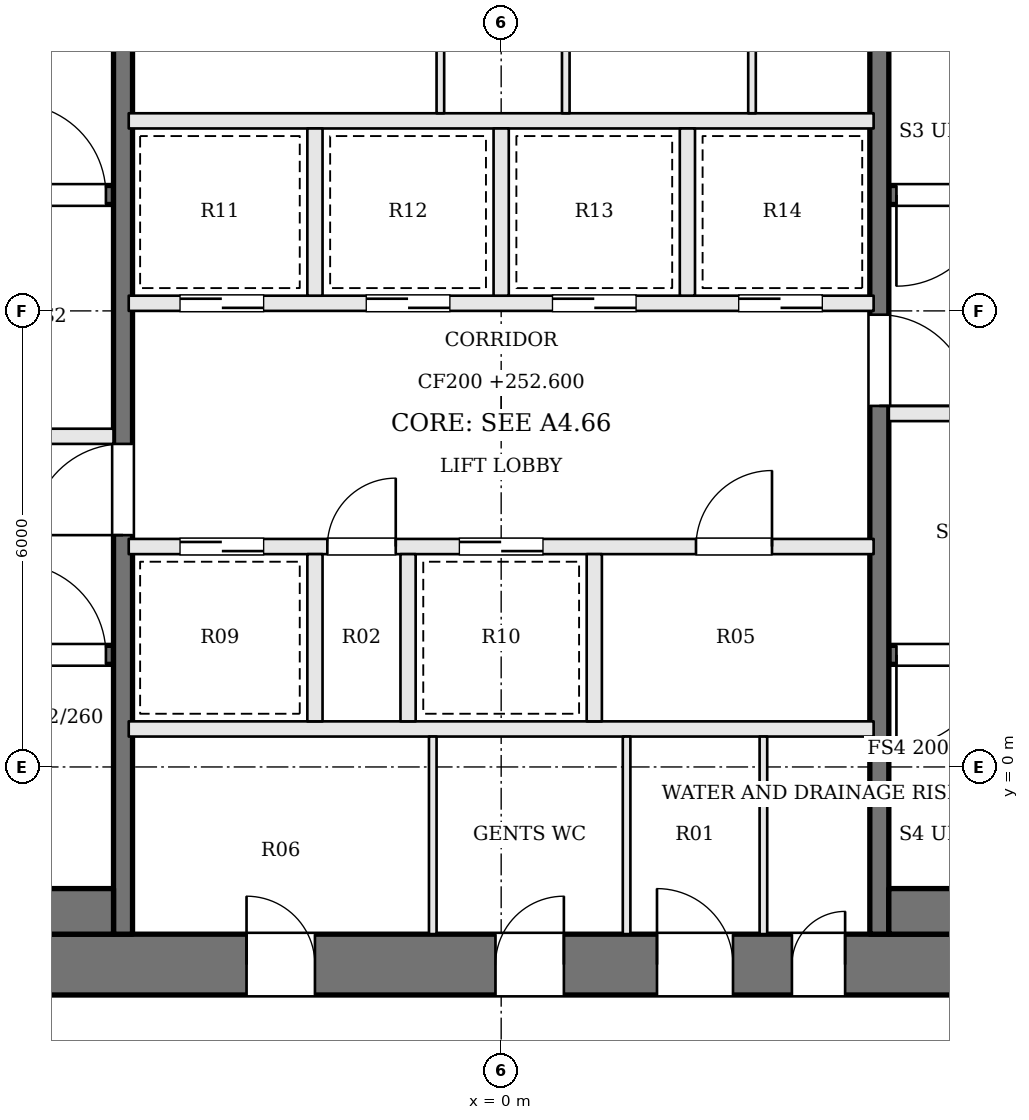
"""IFC4 building model, lengths in metres.
Left out: names, types, materials, properties, quantities, classifications, styles, units other than length and angle.
Written with IfcOpenShell. Run it as: python <this file> out.ifc"""

import sys

from ifc_helpers import new_model, si_unit, direction, frame, frame_2d, origin, place, context, subcontext, project, spatial, rectangle, extrude, element, fill, save


model = new_model("IFC4")
c1 = context("Model", 3, precision=1e-05, world=origin(), true_north=direction((0.0, 1.0)))
c2 = subcontext(c1, "Body", "Model", "MODEL_VIEW")
j1 = project(units=[si_unit("LENGTHUNIT", "METRE"), si_unit("PLANEANGLEUNIT", "RADIAN")], contexts=[c1])
p1 = place(None, origin())
s1 = spatial("IfcSite", under=j1, at=p1, CompositionType="ELEMENT")
p2 = place(p1, origin())
s2 = spatial("IfcBuilding", under=s1, at=p2, CompositionType="ELEMENT")
p3 = place(p2, frame((0.0, 0.0, 252.6)))
s3 = spatial("IfcBuildingStorey", under=s2, at=p3, CompositionType="ELEMENT", Elevation=252.6)
p4 = place(p3, frame((-13.0, -2.6, 0.0), z_axis=(0.0, 0.0, 1.0), x_axis=(1.0, 0.0, 0.0)))
e1 = element("IfcWall", 1, at=p4, inside=s3, PredefinedType="SHEAR", context=c2, shape_type="SweptSolid", body=[
    extrude(rectangle(XDim=26.0, YDim=0.8, at=frame_2d((13.0, 0.0))), origin(), (0.0, 0.0, 1.0), 3.9),
])
p5 = place(p4, frame((9.65, 0.0, 0.0)))
e2 = element("IfcOpeningElement", 2, at=p5, cuts=e1, PredefinedType="OPENING", context=c2, shape_type="SweptSolid", body=[
    extrude(rectangle(XDim=0.9, YDim=2.1, at=frame_2d((0.45, 1.05))), frame((0.0, 0.41, 0.0), z_axis=(0.0, -1.0, 0.0), x_axis=(1.0, 0.0, 0.0)), (0.0, 0.0, 1.0), 0.82),
])
p6 = place(p4, frame((12.925, 0.0, 0.0)))
e3 = element("IfcOpeningElement", 3, at=p6, cuts=e1, PredefinedType="OPENING", context=c2, shape_type="SweptSolid", body=[
    extrude(rectangle(XDim=0.9, YDim=2.1, at=frame_2d((0.45, 1.05))), frame((0.0, 0.41, 0.0), z_axis=(0.0, -1.0, 0.0), x_axis=(1.0, 0.0, 0.0)), (0.0, 0.0, 1.0), 0.82),
])
p7 = place(p4, frame((15.05, 0.0, 0.0)))
e4 = element("IfcOpeningElement", 4, at=p7, cuts=e1, PredefinedType="OPENING", context=c2, shape_type="SweptSolid", body=[
    extrude(rectangle(XDim=1.0, YDim=2.1, at=frame_2d((0.5, 1.05))), frame((0.0, 0.41, 0.0), z_axis=(0.0, -1.0, 0.0), x_axis=(1.0, 0.0, 0.0)), (0.0, 0.0, 1.0), 0.82),
])
p8 = place(p4, frame((16.825, 0.0, 0.0)))
e5 = element("IfcOpeningElement", 5, at=p8, cuts=e1, PredefinedType="OPENING", context=c2, shape_type="SweptSolid", body=[
    extrude(rectangle(XDim=0.7, YDim=2.1, at=frame_2d((0.35, 1.05))), frame((0.0, 0.41, 0.0), z_axis=(0.0, -1.0, 0.0), x_axis=(1.0, 0.0, 0.0)), (0.0, 0.0, 1.0), 0.82),
])
p9 = place(p3, frame((-12.2, 1.475, 0.0), z_axis=(0.0, 0.0, 1.0), x_axis=(1.0, 0.0, 0.0)))
e6 = element("IfcWall", 6, at=p9, inside=s3, PredefinedType="SOLIDWALL", context=c2, shape_type="SweptSolid", body=[
    extrude(rectangle(XDim=7.1, YDim=0.25, at=frame_2d((3.55, 0.0))), origin(), (0.0, 0.0, 1.0), 3.7),
])
p10 = place(p9, frame((5.8, 0.0, 0.0)))
e7 = element("IfcOpeningElement", 7, at=p10, cuts=e6, PredefinedType="OPENING", context=c2, shape_type="SweptSolid", body=[
    extrude(rectangle(XDim=1.2, YDim=2.1, at=frame_2d((0.6, 1.05))), frame((0.0, 0.135, 0.0), z_axis=(0.0, -1.0, 0.0), x_axis=(1.0, 0.0, 0.0)), (0.0, 0.0, 1.0), 0.27),
])
p11 = place(p3, frame((12.2, 7.525, 0.0), z_axis=(0.0, 0.0, 1.0), x_axis=(-1.0, 0.0, 0.0)))
e8 = element("IfcWall", 8, at=p11, inside=s3, PredefinedType="SOLIDWALL", context=c2, shape_type="SweptSolid", body=[
    extrude(rectangle(XDim=7.1, YDim=0.25, at=frame_2d((3.55, 0.0))), origin(), (0.0, 0.0, 1.0), 3.7),
])
p12 = place(p11, frame((5.8, 0.0, 0.0)))
e9 = element("IfcOpeningElement", 9, at=p12, cuts=e8, PredefinedType="OPENING", context=c2, shape_type="SweptSolid", body=[
    extrude(rectangle(XDim=1.2, YDim=2.1, at=frame_2d((0.6, 1.05))), frame((0.0, 0.135, 0.0), z_axis=(0.0, -1.0, 0.0), x_axis=(1.0, 0.0, 0.0)), (0.0, 0.0, 1.0), 0.27),
])
p13 = place(p3, frame((-12.2, 4.35, 0.0), z_axis=(0.0, 0.0, 1.0), x_axis=(1.0, 0.0, 0.0)))
e10 = element("IfcWall", 10, at=p13, inside=s3, PredefinedType="SOLIDWALL", context=c2, shape_type="SweptSolid", body=[
    extrude(rectangle(XDim=7.1, YDim=0.2, at=frame_2d((3.55, 0.0))), origin(), (0.0, 0.0, 1.0), 3.7),
])
p14 = place(p13, frame((4.4, 0.0, 0.0)))
e11 = element("IfcOpeningElement", 11, at=p14, cuts=e10, PredefinedType="OPENING", context=c2, shape_type="SweptSolid", body=[
    extrude(rectangle(XDim=1.2, YDim=2.1, at=frame_2d((0.6, 1.05))), frame((0.0, 0.11, 0.0), z_axis=(0.0, -1.0, 0.0), x_axis=(1.0, 0.0, 0.0)), (0.0, 0.0, 1.0), 0.22),
])
p15 = place(p13, frame((1.1, 0.0, 0.0)))
e12 = element("IfcOpeningElement", 12, at=p15, cuts=e10, PredefinedType="OPENING", context=c2, shape_type="SweptSolid", body=[
    extrude(rectangle(XDim=1.2, YDim=2.1, at=frame_2d((0.6, 1.05))), frame((0.0, 0.11, 0.0), z_axis=(0.0, -1.0, 0.0), x_axis=(1.0, 0.0, 0.0)), (0.0, 0.0, 1.0), 0.22),
])
p16 = place(p3, frame((12.2, 4.65, 0.0), z_axis=(0.0, 0.0, 1.0), x_axis=(-1.0, 0.0, 0.0)))
e13 = element("IfcWall", 13, at=p16, inside=s3, PredefinedType="SOLIDWALL", context=c2, shape_type="SweptSolid", body=[
    extrude(rectangle(XDim=7.1, YDim=0.2, at=frame_2d((3.55, 0.0))), origin(), (0.0, 0.0, 1.0), 3.7),
])
p17 = place(p16, frame((4.4, 0.0, 0.0)))
e14 = element("IfcOpeningElement", 14, at=p17, cuts=e13, PredefinedType="OPENING", context=c2, shape_type="SweptSolid", body=[
    extrude(rectangle(XDim=1.2, YDim=2.1, at=frame_2d((0.6, 1.05))), frame((0.0, 0.11, 0.0), z_axis=(0.0, -1.0, 0.0), x_axis=(1.0, 0.0, 0.0)), (0.0, 0.0, 1.0), 0.22),
])
p18 = place(p16, frame((1.1, 0.0, 0.0)))
e15 = element("IfcOpeningElement", 15, at=p18, cuts=e13, PredefinedType="OPENING", context=c2, shape_type="SweptSolid", body=[
    extrude(rectangle(XDim=1.2, YDim=2.1, at=frame_2d((0.6, 1.05))), frame((0.0, 0.11, 0.0), z_axis=(0.0, -1.0, 0.0), x_axis=(1.0, 0.0, 0.0)), (0.0, 0.0, 1.0), 0.22),
])
p19 = place(p3, frame((-12.2, 7.525, 0.0), z_axis=(0.0, 0.0, 1.0), x_axis=(1.0, 0.0, 0.0)))
e16 = element("IfcWall", 16, at=p19, inside=s3, PredefinedType="SOLIDWALL", context=c2, shape_type="SweptSolid", body=[
    extrude(rectangle(XDim=7.1, YDim=0.25, at=frame_2d((3.55, 0.0))), origin(), (0.0, 0.0, 1.0), 3.7),
])
p20 = place(p19, frame((5.8, 0.0, 0.0)))
e17 = element("IfcOpeningElement", 17, at=p20, cuts=e16, PredefinedType="OPENING", context=c2, shape_type="SweptSolid", body=[
    extrude(rectangle(XDim=1.2, YDim=2.1, at=frame_2d((0.6, 1.05))), frame((0.0, 0.135, 0.0), z_axis=(0.0, -1.0, 0.0), x_axis=(1.0, 0.0, 0.0)), (0.0, 0.0, 1.0), 0.27),
])
p21 = place(p3, frame((12.2, 1.475, 0.0), z_axis=(0.0, 0.0, 1.0), x_axis=(-1.0, 0.0, 0.0)))
e18 = element("IfcWall", 18, at=p21, inside=s3, PredefinedType="SOLIDWALL", context=c2, shape_type="SweptSolid", body=[
    extrude(rectangle(XDim=7.1, YDim=0.25, at=frame_2d((3.55, 0.0))), origin(), (0.0, 0.0, 1.0), 3.7),
])
p22 = place(p21, frame((5.8, 0.0, 0.0)))
e19 = element("IfcOpeningElement", 19, at=p22, cuts=e18, PredefinedType="OPENING", context=c2, shape_type="SweptSolid", body=[
    extrude(rectangle(XDim=1.2, YDim=2.1, at=frame_2d((0.6, 1.05))), frame((0.0, 0.135, 0.0), z_axis=(0.0, -1.0, 0.0), x_axis=(1.0, 0.0, 0.0)), (0.0, 0.0, 1.0), 0.27),
])
p23 = place(p3, frame((-4.975, -2.2, 0.0), z_axis=(0.0, 0.0, 1.0), x_axis=(0.0, 1.0, 0.0)))
e20 = element("IfcWall", 20, at=p23, inside=s3, PredefinedType="SOLIDWALL", context=c2, shape_type="SweptSolid", body=[
    extrude(rectangle(XDim=13.4, YDim=0.25, at=frame_2d((6.7, 0.0))), origin(), (0.0, 0.0, 1.0), 3.7),
])
p24 = place(p23, frame((5.25, 0.0, 0.0)))
e21 = element("IfcOpeningElement", 21, at=p24, cuts=e20, PredefinedType="OPENING", context=c2, shape_type="SweptSolid", body=[
    extrude(rectangle(XDim=1.2, YDim=2.1, at=frame_2d((0.6, 1.05))), frame((0.0, 0.135, 0.0), z_axis=(0.0, -1.0, 0.0), x_axis=(1.0, 0.0, 0.0)), (0.0, 0.0, 1.0), 0.27),
])
p25 = place(p3, frame((4.975, 11.2, 0.0), z_axis=(0.0, 0.0, 1.0), x_axis=(0.0, -1.0, 0.0)))
e22 = element("IfcWall", 22, at=p25, inside=s3, PredefinedType="SOLIDWALL", context=c2, shape_type="SweptSolid", body=[
    extrude(rectangle(XDim=13.4, YDim=0.25, at=frame_2d((6.7, 0.0))), origin(), (0.0, 0.0, 1.0), 3.7),
])
p26 = place(p25, frame((5.25, 0.0, 0.0)))
e23 = element("IfcOpeningElement", 23, at=p26, cuts=e22, PredefinedType="OPENING", context=c2, shape_type="SweptSolid", body=[
    extrude(rectangle(XDim=1.2, YDim=2.1, at=frame_2d((0.6, 1.05))), frame((0.0, 0.135, 0.0), z_axis=(0.0, -1.0, 0.0), x_axis=(1.0, 0.0, 0.0)), (0.0, 0.0, 1.0), 0.27),
])
for number, where, z_axis, x_axis in (
    (24, (-12.2, -1.9, 0.0), (0.0, 0.0, 1.0), (1.0, 0.0, 0.0)),
    (25, (12.2, -1.9, 0.0), (0.0, 0.0, 1.0), (-1.0, 0.0, 0.0)),
):
    element("IfcWall", number, at=place(p3, frame(where, z_axis=z_axis, x_axis=x_axis)), inside=s3, PredefinedType="SOLIDWALL", context=c2, shape_type="SweptSolid", body=[
        extrude(rectangle(XDim=7.1, YDim=0.6, at=frame_2d((3.55, 0.0))), origin(), (0.0, 0.0, 1.0), 3.7),
    ])
p27 = place(p3, frame((-4.9, 0.5, 0.0), z_axis=(0.0, 0.0, 1.0), x_axis=(1.0, 0.0, 0.0)))
e26 = element("IfcWall", 26, at=p27, inside=s3, PredefinedType="SOLIDWALL", context=c2, shape_type="SweptSolid", body=[
    extrude(rectangle(XDim=9.8, YDim=0.2, at=frame_2d((4.9, 0.0))), origin(), (0.0, 0.0, 1.0), 3.7),
])
p28 = place(p3, frame((-4.9, 2.9, 0.0), z_axis=(0.0, 0.0, 1.0), x_axis=(1.0, 0.0, 0.0)))
e27 = element("IfcWall", 27, at=p28, inside=s3, PredefinedType="SOLIDWALL", context=c2, shape_type="SweptSolid", body=[
    extrude(rectangle(XDim=9.8, YDim=0.2, at=frame_2d((4.9, 0.0))), origin(), (0.0, 0.0, 1.0), 3.7),
])
p29 = place(p28, frame((0.675, 0.0, 0.0)))
e28 = element("IfcOpeningElement", 28, at=p29, cuts=e27, PredefinedType="OPENING", context=c2, shape_type="SweptSolid", body=[
    extrude(rectangle(XDim=1.1, YDim=2.1, at=frame_2d((0.55, 1.05))), frame((0.0, 0.11, 0.0), z_axis=(0.0, -1.0, 0.0), x_axis=(1.0, 0.0, 0.0)), (0.0, 0.0, 1.0), 0.22),
])
p30 = place(p28, frame((2.613, 0.0, 0.0)))
e29 = element("IfcOpeningElement", 29, at=p30, cuts=e27, PredefinedType="OPENING", context=c2, shape_type="SweptSolid", body=[
    extrude(rectangle(XDim=0.9, YDim=2.1, at=frame_2d((0.45, 1.05))), frame((0.0, 0.11, 0.0), z_axis=(0.0, -1.0, 0.0), x_axis=(1.0, 0.0, 0.0)), (0.0, 0.0, 1.0), 0.22),
])
p31 = place(p28, frame((4.35, 0.0, 0.0)))
e30 = element("IfcOpeningElement", 30, at=p31, cuts=e27, PredefinedType="OPENING", context=c2, shape_type="SweptSolid", body=[
    extrude(rectangle(XDim=1.1, YDim=2.1, at=frame_2d((0.55, 1.05))), frame((0.0, 0.11, 0.0), z_axis=(0.0, -1.0, 0.0), x_axis=(1.0, 0.0, 0.0)), (0.0, 0.0, 1.0), 0.22),
])
p32 = place(p28, frame((7.463, 0.0, 0.0)))
e31 = element("IfcOpeningElement", 31, at=p32, cuts=e27, PredefinedType="OPENING", context=c2, shape_type="SweptSolid", body=[
    extrude(rectangle(XDim=1.0, YDim=2.1, at=frame_2d((0.5, 1.05))), frame((0.0, 0.11, 0.0), z_axis=(0.0, -1.0, 0.0), x_axis=(1.0, 0.0, 0.0)), (0.0, 0.0, 1.0), 0.22),
])
p33 = place(p3, frame((-4.9, 6.1, 0.0), z_axis=(0.0, 0.0, 1.0), x_axis=(1.0, 0.0, 0.0)))
e32 = element("IfcWall", 32, at=p33, inside=s3, PredefinedType="SOLIDWALL", context=c2, shape_type="SweptSolid", body=[
    extrude(rectangle(XDim=9.8, YDim=0.2, at=frame_2d((4.9, 0.0))), origin(), (0.0, 0.0, 1.0), 3.7),
])
p34 = place(p33, frame((0.675, 0.0, 0.0)))
e33 = element("IfcOpeningElement", 33, at=p34, cuts=e32, PredefinedType="OPENING", context=c2, shape_type="SweptSolid", body=[
    extrude(rectangle(XDim=1.1, YDim=2.1, at=frame_2d((0.55, 1.05))), frame((0.0, 0.11, 0.0), z_axis=(0.0, -1.0, 0.0), x_axis=(1.0, 0.0, 0.0)), (0.0, 0.0, 1.0), 0.22),
])
p35 = place(p33, frame((3.125, 0.0, 0.0)))
e34 = element("IfcOpeningElement", 34, at=p35, cuts=e32, PredefinedType="OPENING", context=c2, shape_type="SweptSolid", body=[
    extrude(rectangle(XDim=1.1, YDim=2.1, at=frame_2d((0.55, 1.05))), frame((0.0, 0.11, 0.0), z_axis=(0.0, -1.0, 0.0), x_axis=(1.0, 0.0, 0.0)), (0.0, 0.0, 1.0), 0.22),
])
p36 = place(p33, frame((5.575, 0.0, 0.0)))
e35 = element("IfcOpeningElement", 35, at=p36, cuts=e32, PredefinedType="OPENING", context=c2, shape_type="SweptSolid", body=[
    extrude(rectangle(XDim=1.1, YDim=2.1, at=frame_2d((0.55, 1.05))), frame((0.0, 0.11, 0.0), z_axis=(0.0, -1.0, 0.0), x_axis=(1.0, 0.0, 0.0)), (0.0, 0.0, 1.0), 0.22),
])
p37 = place(p33, frame((8.025, 0.0, 0.0)))
e36 = element("IfcOpeningElement", 36, at=p37, cuts=e32, PredefinedType="OPENING", context=c2, shape_type="SweptSolid", body=[
    extrude(rectangle(XDim=1.1, YDim=2.1, at=frame_2d((0.55, 1.05))), frame((0.0, 0.11, 0.0), z_axis=(0.0, -1.0, 0.0), x_axis=(1.0, 0.0, 0.0)), (0.0, 0.0, 1.0), 0.22),
])
p38 = place(p3, frame((-4.9, 8.5, 0.0), z_axis=(0.0, 0.0, 1.0), x_axis=(1.0, 0.0, 0.0)))
e37 = element("IfcWall", 37, at=p38, inside=s3, PredefinedType="SOLIDWALL", context=c2, shape_type="SweptSolid", body=[
    extrude(rectangle(XDim=9.8, YDim=0.2, at=frame_2d((4.9, 0.0))), origin(), (0.0, 0.0, 1.0), 3.7),
])
for number, where, z_axis, x_axis in (
    (38, (-2.45, 0.6, 0.0), (0.0, 0.0, 1.0), (0.0, 1.0, 0.0)),
    (39, (-1.225, 0.6, 0.0), (0.0, 0.0, 1.0), (0.0, 1.0, 0.0)),
    (40, (1.225, 0.6, 0.0), (0.0, 0.0, 1.0), (0.0, 1.0, 0.0)),
    (41, (-2.45, 6.2, 0.0), (0.0, 0.0, 1.0), (0.0, 1.0, 0.0)),
    (42, (0.0, 6.2, 0.0), (0.0, 0.0, 1.0), (0.0, 1.0, 0.0)),
    (43, (2.45, 6.2, 0.0), (0.0, 0.0, 1.0), (0.0, 1.0, 0.0)),
):
    element("IfcWall", number, at=place(p3, frame(where, z_axis=z_axis, x_axis=x_axis)), inside=s3, PredefinedType="SOLIDWALL", context=c2, shape_type="SweptSolid", body=[
        extrude(rectangle(XDim=2.2, YDim=0.2, at=frame_2d((1.1, 0.0))), origin(), (0.0, 0.0, 1.0), 3.7),
    ])
for number, where, z_axis, x_axis in (
    (44, (-0.9, -2.2, 0.0), (0.0, 0.0, 1.0), (0.0, 1.0, 0.0)),
    (45, (1.65, -2.2, 0.0), (0.0, 0.0, 1.0), (0.0, 1.0, 0.0)),
    (46, (3.45, -2.2, 0.0), (0.0, 0.0, 1.0), (0.0, 1.0, 0.0)),
    (47, (-0.8, 8.6, 0.0), (0.0, 0.0, 1.0), (0.0, 1.0, 0.0)),
    (48, (0.85, 8.6, 0.0), (0.0, 0.0, 1.0), (0.0, 1.0, 0.0)),
    (49, (3.3, 8.6, 0.0), (0.0, 0.0, 1.0), (0.0, 1.0, 0.0)),
):
    element("IfcWall", number, at=place(p3, frame(where, z_axis=z_axis, x_axis=x_axis)), inside=s3, PredefinedType="PARTITIONING", context=c2, shape_type="SweptSolid", body=[
        extrude(rectangle(XDim=2.6, YDim=0.1, at=frame_2d((1.3, 0.0))), origin(), (0.0, 0.0, 1.0), 3.7),
    ])
p39 = place(p24, origin())
e50 = element("IfcDoor", 50, at=p39, inside=s3, OperationType="SINGLE_SWING_LEFT", PredefinedType="DOOR", context=c2, shape_type="SweptSolid", body=[
    extrude(rectangle(XDim=1.2, YDim=2.1, at=frame_2d((0.6, 1.05))), frame((0.0, 0.025, 0.0), z_axis=(0.0, -1.0, 0.0), x_axis=(1.0, 0.0, 0.0)), (0.0, 0.0, 1.0), 0.05),
])
fill(e21, e50)
p40 = place(p26, origin())
e51 = element("IfcDoor", 51, at=p40, inside=s3, OperationType="SINGLE_SWING_RIGHT", PredefinedType="DOOR", context=c2, shape_type="SweptSolid", body=[
    extrude(rectangle(XDim=1.2, YDim=2.1, at=frame_2d((0.6, 1.05))), frame((0.0, 0.025, 0.0), z_axis=(0.0, -1.0, 0.0), x_axis=(1.0, 0.0, 0.0)), (0.0, 0.0, 1.0), 0.05),
])
fill(e23, e51)
p41 = place(p10, origin())
e52 = element("IfcDoor", 52, at=p41, inside=s3, OperationType="SINGLE_SWING_LEFT", PredefinedType="DOOR", context=c2, shape_type="SweptSolid", body=[
    extrude(rectangle(XDim=1.2, YDim=2.1, at=frame_2d((0.6, 1.05))), frame((0.0, 0.025, 0.0), z_axis=(0.0, -1.0, 0.0), x_axis=(1.0, 0.0, 0.0)), (0.0, 0.0, 1.0), 0.05),
])
fill(e7, e52)
p42 = place(p12, origin())
e53 = element("IfcDoor", 53, at=p42, inside=s3, OperationType="SINGLE_SWING_RIGHT", PredefinedType="DOOR", context=c2, shape_type="SweptSolid", body=[
    extrude(rectangle(XDim=1.2, YDim=2.1, at=frame_2d((0.6, 1.05))), frame((0.0, 0.025, 0.0), z_axis=(0.0, -1.0, 0.0), x_axis=(1.0, 0.0, 0.0)), (0.0, 0.0, 1.0), 0.05),
])
fill(e9, e53)
p43 = place(p20, origin())
e54 = element("IfcDoor", 54, at=p43, inside=s3, OperationType="SINGLE_SWING_LEFT", PredefinedType="DOOR", context=c2, shape_type="SweptSolid", body=[
    extrude(rectangle(XDim=1.2, YDim=2.1, at=frame_2d((0.6, 1.05))), frame((0.0, 0.025, 0.0), z_axis=(0.0, -1.0, 0.0), x_axis=(1.0, 0.0, 0.0)), (0.0, 0.0, 1.0), 0.05),
])
fill(e17, e54)
p44 = place(p22, origin())
e55 = element("IfcDoor", 55, at=p44, inside=s3, OperationType="SINGLE_SWING_RIGHT", PredefinedType="DOOR", context=c2, shape_type="SweptSolid", body=[
    extrude(rectangle(XDim=1.2, YDim=2.1, at=frame_2d((0.6, 1.05))), frame((0.0, 0.025, 0.0), z_axis=(0.0, -1.0, 0.0), x_axis=(1.0, 0.0, 0.0)), (0.0, 0.0, 1.0), 0.05),
])
fill(e19, e55)
p45 = place(p29, origin())
e56 = element("IfcDoor", 56, at=p45, inside=s3, OperationType="SLIDING_TO_RIGHT", PredefinedType="DOOR", context=c2, shape_type="SweptSolid", body=[
    extrude(rectangle(XDim=1.1, YDim=2.1, at=frame_2d((0.55, 1.05))), frame((0.0, 0.025, 0.0), z_axis=(0.0, -1.0, 0.0), x_axis=(1.0, 0.0, 0.0)), (0.0, 0.0, 1.0), 0.05),
])
fill(e28, e56)
p46 = place(p30, origin())
e57 = element("IfcDoor", 57, at=p46, inside=s3, OperationType="SINGLE_SWING_RIGHT", PredefinedType="DOOR", context=c2, shape_type="SweptSolid", body=[
    extrude(rectangle(XDim=0.9, YDim=2.1, at=frame_2d((0.45, 1.05))), frame((0.0, 0.025, 0.0), z_axis=(0.0, -1.0, 0.0), x_axis=(1.0, 0.0, 0.0)), (0.0, 0.0, 1.0), 0.05),
])
fill(e29, e57)
p47 = place(p31, origin())
e58 = element("IfcDoor", 58, at=p47, inside=s3, OperationType="SLIDING_TO_LEFT", PredefinedType="DOOR", context=c2, shape_type="SweptSolid", body=[
    extrude(rectangle(XDim=1.1, YDim=2.1, at=frame_2d((0.55, 1.05))), frame((0.0, 0.025, 0.0), z_axis=(0.0, -1.0, 0.0), x_axis=(1.0, 0.0, 0.0)), (0.0, 0.0, 1.0), 0.05),
])
fill(e30, e58)
p48 = place(p32, origin())
e59 = element("IfcDoor", 59, at=p48, inside=s3, OperationType="SINGLE_SWING_RIGHT", PredefinedType="DOOR", context=c2, shape_type="SweptSolid", body=[
    extrude(rectangle(XDim=1.0, YDim=2.1, at=frame_2d((0.5, 1.05))), frame((0.0, 0.025, 0.0), z_axis=(0.0, -1.0, 0.0), x_axis=(1.0, 0.0, 0.0)), (0.0, 0.0, 1.0), 0.05),
])
fill(e31, e59)
p49 = place(p34, origin())
e60 = element("IfcDoor", 60, at=p49, inside=s3, OperationType="SLIDING_TO_RIGHT", PredefinedType="DOOR", context=c2, shape_type="SweptSolid", body=[
    extrude(rectangle(XDim=1.1, YDim=2.1, at=frame_2d((0.55, 1.05))), frame((0.0, 0.025, 0.0), z_axis=(0.0, -1.0, 0.0), x_axis=(1.0, 0.0, 0.0)), (0.0, 0.0, 1.0), 0.05),
])
fill(e33, e60)
p50 = place(p35, origin())
e61 = element("IfcDoor", 61, at=p50, inside=s3, OperationType="SLIDING_TO_LEFT", PredefinedType="DOOR", context=c2, shape_type="SweptSolid", body=[
    extrude(rectangle(XDim=1.1, YDim=2.1, at=frame_2d((0.55, 1.05))), frame((0.0, 0.025, 0.0), z_axis=(0.0, -1.0, 0.0), x_axis=(1.0, 0.0, 0.0)), (0.0, 0.0, 1.0), 0.05),
])
fill(e34, e61)
p51 = place(p36, origin())
e62 = element("IfcDoor", 62, at=p51, inside=s3, OperationType="SLIDING_TO_RIGHT", PredefinedType="DOOR", context=c2, shape_type="SweptSolid", body=[
    extrude(rectangle(XDim=1.1, YDim=2.1, at=frame_2d((0.55, 1.05))), frame((0.0, 0.025, 0.0), z_axis=(0.0, -1.0, 0.0), x_axis=(1.0, 0.0, 0.0)), (0.0, 0.0, 1.0), 0.05),
])
fill(e35, e62)
p52 = place(p37, origin())
e63 = element("IfcDoor", 63, at=p52, inside=s3, OperationType="SLIDING_TO_LEFT", PredefinedType="DOOR", context=c2, shape_type="SweptSolid", body=[
    extrude(rectangle(XDim=1.1, YDim=2.1, at=frame_2d((0.55, 1.05))), frame((0.0, 0.025, 0.0), z_axis=(0.0, -1.0, 0.0), x_axis=(1.0, 0.0, 0.0)), (0.0, 0.0, 1.0), 0.05),
])
fill(e36, e63)
p53 = place(p5, origin())
e64 = element("IfcDoor", 64, at=p53, inside=s3, OperationType="SINGLE_SWING_LEFT", PredefinedType="DOOR", context=c2, shape_type="SweptSolid", body=[
    extrude(rectangle(XDim=0.9, YDim=2.1, at=frame_2d((0.45, 1.05))), frame((0.0, 0.025, 0.0), z_axis=(0.0, -1.0, 0.0), x_axis=(1.0, 0.0, 0.0)), (0.0, 0.0, 1.0), 0.05),
])
fill(e2, e64)
p54 = place(p6, origin())
e65 = element("IfcDoor", 65, at=p54, inside=s3, OperationType="SINGLE_SWING_RIGHT", PredefinedType="DOOR", context=c2, shape_type="SweptSolid", body=[
    extrude(rectangle(XDim=0.9, YDim=2.1, at=frame_2d((0.45, 1.05))), frame((0.0, 0.025, 0.0), z_axis=(0.0, -1.0, 0.0), x_axis=(1.0, 0.0, 0.0)), (0.0, 0.0, 1.0), 0.05),
])
fill(e3, e65)
p55 = place(p7, origin())
e66 = element("IfcDoor", 66, at=p55, inside=s3, OperationType="SINGLE_SWING_LEFT", PredefinedType="DOOR", context=c2, shape_type="SweptSolid", body=[
    extrude(rectangle(XDim=1.0, YDim=2.1, at=frame_2d((0.5, 1.05))), frame((0.0, 0.025, 0.0), z_axis=(0.0, -1.0, 0.0), x_axis=(1.0, 0.0, 0.0)), (0.0, 0.0, 1.0), 0.05),
])
fill(e4, e66)
p56 = place(p8, origin())
e67 = element("IfcDoor", 67, at=p56, inside=s3, OperationType="SINGLE_SWING_RIGHT", PredefinedType="DOOR", context=c2, shape_type="SweptSolid", body=[
    extrude(rectangle(XDim=0.7, YDim=2.1, at=frame_2d((0.35, 1.05))), frame((0.0, 0.025, 0.0), z_axis=(0.0, -1.0, 0.0), x_axis=(1.0, 0.0, 0.0)), (0.0, 0.0, 1.0), 0.05),
])
fill(e5, e67)
save(model, sys.argv[1])
